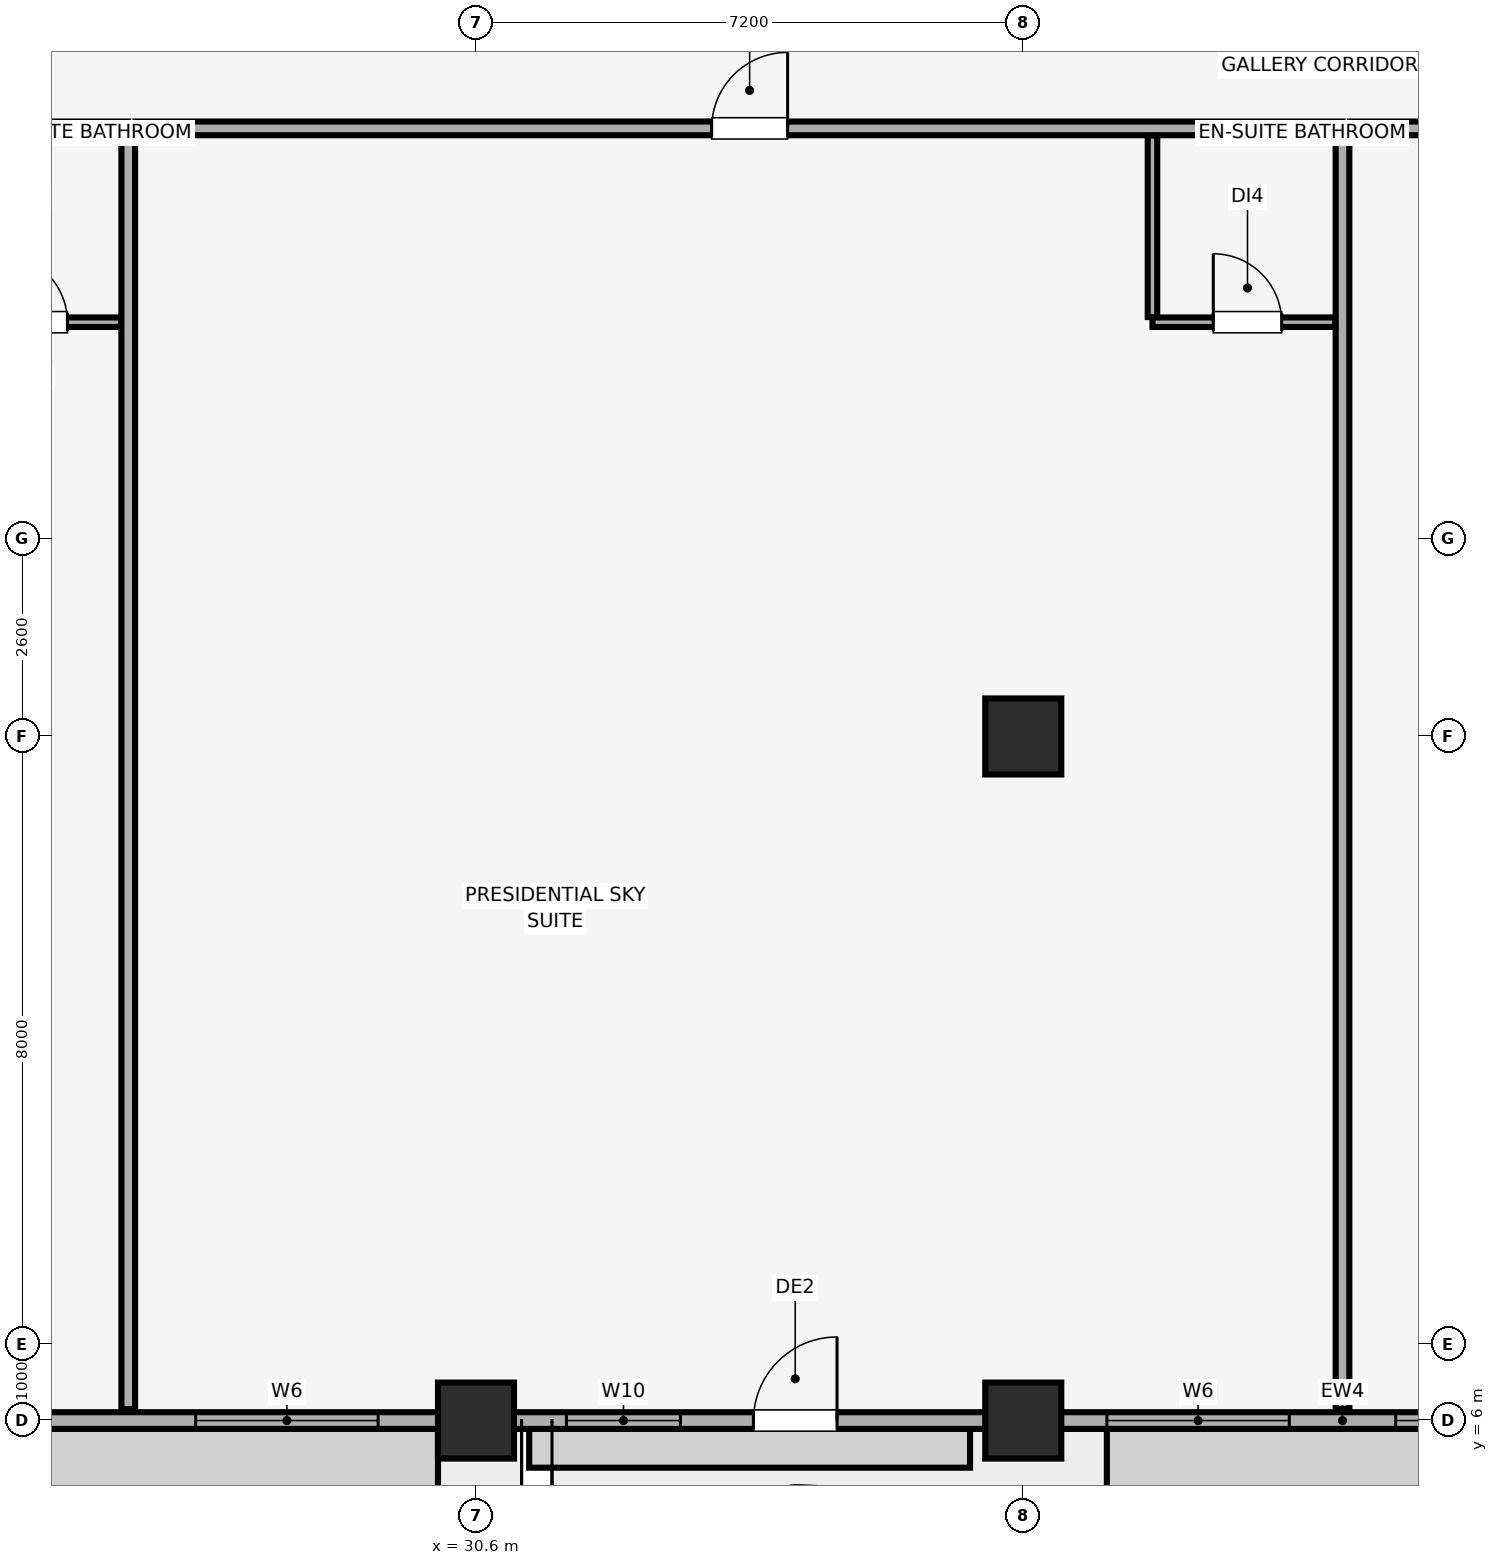
"""IFC4 building model, lengths in metres.
Left out: names, types, materials, properties, quantities, classifications, styles, units other than length and angle.
Written with IfcOpenShell. Run it as: python <this file> out.ifc"""

import sys

from ifc_helpers import new_model, si_unit, direction, frame, frame_2d, origin, origin_2d, place, context, subcontext, project, spatial, rectangle, extrude, element, fill, save


model = new_model("IFC4")
c1 = context("Model", 3, precision=1e-05, world=origin(), true_north=direction((0.0, 1.0)))
c2 = subcontext(c1, "Body", "Model", "MODEL_VIEW")
j1 = project(units=[si_unit("LENGTHUNIT", "METRE"), si_unit("PLANEANGLEUNIT", "RADIAN")], contexts=[c1])
p1 = place(None, origin())
s1 = spatial("IfcSite", under=j1, at=p1, CompositionType="ELEMENT")
p2 = place(p1, origin())
s2 = spatial("IfcBuilding", under=s1, at=p2, CompositionType="ELEMENT")
p3 = place(p2, frame((0.0, 0.0, 276.55)))
s3 = spatial("IfcBuildingStorey", under=s2, at=p3, CompositionType="ELEMENT", Elevation=276.55)
for number, where, z_axis, x_axis in (
    (1, (30.6, 6.0, 0.0), (0.0, 0.0, 1.0), (1.0, 0.0, 0.0)),
    (2, (37.8, 6.0, 0.0), (0.0, 0.0, 1.0), (1.0, 0.0, 0.0)),
    (3, (37.8, 15.0, 0.0), (0.0, 0.0, 1.0), (1.0, 0.0, 0.0)),
):
    element("IfcColumn", number, at=place(p3, frame(where, z_axis=z_axis, x_axis=x_axis)), inside=s3, PredefinedType="COLUMN", context=c2, shape_type="SweptSolid", body=[
        extrude(rectangle(XDim=1.0, YDim=1.0, at=origin_2d()), origin(), (0.0, 0.0, 1.0), 3.6),
    ])
p4 = place(p3, frame((9.8, 6.0, 0.0), z_axis=(0.0, 0.0, 1.0), x_axis=(1.0, 0.0, 0.0)))
e4 = element("IfcWall", 4, at=p4, inside=s3, PredefinedType="SOLIDWALL", context=c2, shape_type="SweptSolid", body=[
    extrude(rectangle(XDim=64.4, YDim=0.22, at=frame_2d((32.2, 0.0))), origin(), (0.0, 0.0, 1.0), 2.8),
])
p5 = place(p4, frame((10.45, 0.0, 0.0)))
e5 = element("IfcOpeningElement", 5, at=p5, cuts=e4, PredefinedType="OPENING", context=c2, shape_type="SweptSolid", body=[
    extrude(rectangle(XDim=1.1, YDim=2.15, at=frame_2d((0.55, 1.075))), frame((0.0, 0.12, 0.0), z_axis=(0.0, -1.0, 0.0), x_axis=(1.0, 0.0, 0.0)), (0.0, 0.0, 1.0), 0.24),
])
p6 = place(p4, frame((24.45, 0.0, 0.0)))
e6 = element("IfcOpeningElement", 6, at=p6, cuts=e4, PredefinedType="OPENING", context=c2, shape_type="SweptSolid", body=[
    extrude(rectangle(XDim=1.1, YDim=2.15, at=frame_2d((0.55, 1.075))), frame((0.0, 0.12, 0.0), z_axis=(0.0, -1.0, 0.0), x_axis=(1.0, 0.0, 0.0)), (0.0, 0.0, 1.0), 0.24),
])
p7 = place(p4, frame((52.85, 0.0, 0.0)))
e7 = element("IfcOpeningElement", 7, at=p7, cuts=e4, PredefinedType="OPENING", context=c2, shape_type="SweptSolid", body=[
    extrude(rectangle(XDim=1.1, YDim=2.15, at=frame_2d((0.55, 1.075))), frame((0.0, 0.12, 0.0), z_axis=(0.0, -1.0, 0.0), x_axis=(1.0, 0.0, 0.0)), (0.0, 0.0, 1.0), 0.24),
])
p8 = place(p4, frame((1.235, 0.0, 0.85)))
e8 = element("IfcOpeningElement", 8, at=p8, cuts=e4, PredefinedType="OPENING", context=c2, shape_type="SweptSolid", body=[
    extrude(rectangle(XDim=3.6, YDim=1.75, at=frame_2d((1.8, 0.875))), frame((0.0, 0.12, 0.0), z_axis=(0.0, -1.0, 0.0), x_axis=(1.0, 0.0, 0.0)), (0.0, 0.0, 1.0), 0.24),
])
p9 = place(p4, frame((7.34, 0.0, 0.85)))
e9 = element("IfcOpeningElement", 9, at=p9, cuts=e4, PredefinedType="OPENING", context=c2, shape_type="SweptSolid", body=[
    extrude(rectangle(XDim=2.4, YDim=1.5, at=frame_2d((1.2, 0.75))), frame((0.0, 0.12, 0.0), z_axis=(0.0, -1.0, 0.0), x_axis=(1.0, 0.0, 0.0)), (0.0, 0.0, 1.0), 0.24),
])
p10 = place(p4, frame((17.113, 0.0, 0.85)))
e10 = element("IfcOpeningElement", 10, at=p10, cuts=e4, PredefinedType="OPENING", context=c2, shape_type="SweptSolid", body=[
    extrude(rectangle(XDim=2.4, YDim=1.5, at=frame_2d((1.2, 0.75))), frame((0.0, 0.12, 0.0), z_axis=(0.0, -1.0, 0.0), x_axis=(1.0, 0.0, 0.0)), (0.0, 0.0, 1.0), 0.24),
])
p11 = place(p4, frame((21.99, 0.0, 0.85)))
e11 = element("IfcOpeningElement", 11, at=p11, cuts=e4, PredefinedType="OPENING", context=c2, shape_type="SweptSolid", body=[
    extrude(rectangle(XDim=1.5, YDim=1.4, at=frame_2d((0.75, 0.7))), frame((0.0, 0.12, 0.0), z_axis=(0.0, -1.0, 0.0), x_axis=(1.0, 0.0, 0.0)), (0.0, 0.0, 1.0), 0.24),
])
p12 = place(p4, frame((29.1, 0.0, 0.85)))
e12 = element("IfcOpeningElement", 12, at=p12, cuts=e4, PredefinedType="OPENING", context=c2, shape_type="SweptSolid", body=[
    extrude(rectangle(XDim=2.4, YDim=1.5, at=frame_2d((1.2, 0.75))), frame((0.0, 0.12, 0.0), z_axis=(0.0, -1.0, 0.0), x_axis=(1.0, 0.0, 0.0)), (0.0, 0.0, 1.0), 0.24),
])
p13 = place(p4, frame((32.9, 0.0, 0.85)))
e13 = element("IfcOpeningElement", 13, at=p13, cuts=e4, PredefinedType="OPENING", context=c2, shape_type="SweptSolid", body=[
    extrude(rectangle(XDim=2.4, YDim=1.5, at=frame_2d((1.2, 0.75))), frame((0.0, 0.12, 0.0), z_axis=(0.0, -1.0, 0.0), x_axis=(1.0, 0.0, 0.0)), (0.0, 0.0, 1.0), 0.24),
])
p14 = place(p4, frame((38.2, 0.0, 0.85)))
e14 = element("IfcOpeningElement", 14, at=p14, cuts=e4, PredefinedType="OPENING", context=c2, shape_type="SweptSolid", body=[
    extrude(rectangle(XDim=3.6, YDim=1.75, at=frame_2d((1.8, 0.875))), frame((0.0, 0.12, 0.0), z_axis=(0.0, -1.0, 0.0), x_axis=(1.0, 0.0, 0.0)), (0.0, 0.0, 1.0), 0.24),
])
p15 = place(p4, frame((44.887, 0.0, 0.85)))
e15 = element("IfcOpeningElement", 15, at=p15, cuts=e4, PredefinedType="OPENING", context=c2, shape_type="SweptSolid", body=[
    extrude(rectangle(XDim=2.4, YDim=1.5, at=frame_2d((1.2, 0.75))), frame((0.0, 0.12, 0.0), z_axis=(0.0, -1.0, 0.0), x_axis=(1.0, 0.0, 0.0)), (0.0, 0.0, 1.0), 0.24),
])
p16 = place(p4, frame((54.66, 0.0, 0.85)))
e16 = element("IfcOpeningElement", 16, at=p16, cuts=e4, PredefinedType="OPENING", context=c2, shape_type="SweptSolid", body=[
    extrude(rectangle(XDim=2.4, YDim=1.5, at=frame_2d((1.2, 0.75))), frame((0.0, 0.12, 0.0), z_axis=(0.0, -1.0, 0.0), x_axis=(1.0, 0.0, 0.0)), (0.0, 0.0, 1.0), 0.24),
])
p17 = place(p4, frame((59.565, 0.0, 0.85)))
e17 = element("IfcOpeningElement", 17, at=p17, cuts=e4, PredefinedType="OPENING", context=c2, shape_type="SweptSolid", body=[
    extrude(rectangle(XDim=3.6, YDim=1.75, at=frame_2d((1.8, 0.875))), frame((0.0, 0.12, 0.0), z_axis=(0.0, -1.0, 0.0), x_axis=(1.0, 0.0, 0.0)), (0.0, 0.0, 1.0), 0.24),
])
p18 = place(p3, frame((6.15, 23.0, 0.0), z_axis=(0.0, 0.0, 1.0), x_axis=(1.0, 0.0, 0.0)))
e18 = element("IfcWall", 18, at=p18, inside=s3, PredefinedType="PARTITIONING", context=c2, shape_type="SweptSolid", body=[
    extrude(rectangle(XDim=19.875, YDim=0.18, at=frame_2d((9.938, 0.0))), origin(), (0.0, 0.0, 1.0), 3.6),
])
p19 = place(p18, frame((13.15, 0.0, 0.0)))
e19 = element("IfcOpeningElement", 19, at=p19, cuts=e18, PredefinedType="OPENING", context=c2, shape_type="SweptSolid", body=[
    extrude(rectangle(XDim=1.0, YDim=2.15, at=frame_2d((0.5, 1.075))), frame((0.0, 0.1, 0.0), z_axis=(0.0, -1.0, 0.0), x_axis=(1.0, 0.0, 0.0)), (0.0, 0.0, 1.0), 0.2),
])
p20 = place(p3, frame((26.025, 6.15, 0.0), z_axis=(0.0, 0.0, 1.0), x_axis=(0.0, 1.0, 0.0)))
e20 = element("IfcWall", 20, at=p20, inside=s3, PredefinedType="PARTITIONING", context=c2, shape_type="SweptSolid", body=[
    extrude(rectangle(XDim=16.755, YDim=0.18, at=frame_2d((8.377, 0.0))), origin(), (0.0, 0.0, 1.0), 3.6),
])
p21 = place(p3, frame((23.525, 20.45, 0.0), z_axis=(0.0, 0.0, 1.0), x_axis=(1.0, 0.0, 0.0)))
e21 = element("IfcWall", 21, at=p21, inside=s3, PredefinedType="PARTITIONING", context=c2, shape_type="SweptSolid", body=[
    extrude(rectangle(XDim=2.405, YDim=0.125, at=frame_2d((1.203, 0.0))), origin(), (0.0, 0.0, 1.0), 3.6),
])
p22 = place(p21, frame((0.8, 0.0, 0.0)))
e22 = element("IfcOpeningElement", 22, at=p22, cuts=e21, PredefinedType="OPENING", context=c2, shape_type="SweptSolid", body=[
    extrude(rectangle(XDim=0.9, YDim=2.1, at=frame_2d((0.45, 1.05))), frame((0.0, 0.073, 0.0), z_axis=(0.0, -1.0, 0.0), x_axis=(1.0, 0.0, 0.0)), (0.0, 0.0, 1.0), 0.145),
])
p23 = place(p3, frame((26.12, 23.0, 0.0), z_axis=(0.0, 0.0, 1.0), x_axis=(1.0, 0.0, 0.0)))
e23 = element("IfcWall", 23, at=p23, inside=s3, PredefinedType="PARTITIONING", context=c2, shape_type="SweptSolid", body=[
    extrude(rectangle(XDim=15.88, YDim=0.18, at=frame_2d((7.94, 0.0))), origin(), (0.0, 0.0, 1.0), 3.6),
])
p24 = place(p23, frame((7.58, 0.0, 0.0)))
e24 = element("IfcOpeningElement", 24, at=p24, cuts=e23, PredefinedType="OPENING", context=c2, shape_type="SweptSolid", body=[
    extrude(rectangle(XDim=1.0, YDim=2.15, at=frame_2d((0.5, 1.075))), frame((0.0, 0.1, 0.0), z_axis=(0.0, -1.0, 0.0), x_axis=(1.0, 0.0, 0.0)), (0.0, 0.0, 1.0), 0.2),
])
p25 = place(p3, frame((42.0, 6.15, 0.0), z_axis=(0.0, 0.0, 1.0), x_axis=(0.0, 1.0, 0.0)))
e25 = element("IfcWall", 25, at=p25, inside=s3, PredefinedType="PARTITIONING", context=c2, shape_type="SweptSolid", body=[
    extrude(rectangle(XDim=16.755, YDim=0.18, at=frame_2d((8.377, 0.0))), origin(), (0.0, 0.0, 1.0), 3.0),
])
p26 = place(p3, frame((39.5, 20.45, 0.0), z_axis=(0.0, 0.0, 1.0), x_axis=(1.0, 0.0, 0.0)))
e26 = element("IfcWall", 26, at=p26, inside=s3, PredefinedType="PARTITIONING", context=c2, shape_type="SweptSolid", body=[
    extrude(rectangle(XDim=2.405, YDim=0.125, at=frame_2d((1.203, 0.0))), origin(), (0.0, 0.0, 1.0), 3.6),
])
p27 = place(p26, frame((0.8, 0.0, 0.0)))
e27 = element("IfcOpeningElement", 27, at=p27, cuts=e26, PredefinedType="OPENING", context=c2, shape_type="SweptSolid", body=[
    extrude(rectangle(XDim=0.9, YDim=2.1, at=frame_2d((0.45, 1.05))), frame((0.0, 0.073, 0.0), z_axis=(0.0, -1.0, 0.0), x_axis=(1.0, 0.0, 0.0)), (0.0, 0.0, 1.0), 0.145),
])
p28 = place(p3, frame((39.5, 20.518, 0.0), z_axis=(0.0, 0.0, 1.0), x_axis=(0.0, 1.0, 0.0)))
e28 = element("IfcWall", 28, at=p28, inside=s3, PredefinedType="PARTITIONING", context=c2, shape_type="SweptSolid", body=[
    extrude(rectangle(XDim=2.387, YDim=0.125, at=frame_2d((1.194, 0.0))), origin(), (0.0, 0.0, 1.0), 3.6),
])
p29 = place(p3, frame((42.095, 23.0, 0.0), z_axis=(0.0, 0.0, 1.0), x_axis=(1.0, 0.0, 0.0)))
e29 = element("IfcWall", 29, at=p29, inside=s3, PredefinedType="PARTITIONING", context=c2, shape_type="SweptSolid", body=[
    extrude(rectangle(XDim=15.88, YDim=0.18, at=frame_2d((7.94, 0.0))), origin(), (0.0, 0.0, 1.0), 3.6),
])
p30 = place(p29, frame((7.205, 0.0, 0.0)))
e30 = element("IfcOpeningElement", 30, at=p30, cuts=e29, PredefinedType="OPENING", context=c2, shape_type="SweptSolid", body=[
    extrude(rectangle(XDim=1.0, YDim=2.15, at=frame_2d((0.5, 1.075))), frame((0.0, 0.1, 0.0), z_axis=(0.0, -1.0, 0.0), x_axis=(1.0, 0.0, 0.0)), (0.0, 0.0, 1.0), 0.2),
])
p31 = place(p6, origin())
e31 = element("IfcDoor", 31, at=p31, inside=s3, OperationType="SINGLE_SWING_RIGHT", PredefinedType="DOOR", context=c2, shape_type="SweptSolid", body=[
    extrude(rectangle(XDim=1.1, YDim=2.15, at=frame_2d((0.55, 1.075))), frame((0.0, 0.025, 0.0), z_axis=(0.0, -1.0, 0.0), x_axis=(1.0, 0.0, 0.0)), (0.0, 0.0, 1.0), 0.05),
])
fill(e6, e31)
p32 = place(p10, origin())
e32 = element("IfcWindow", 32, at=p32, inside=s3, PartitioningType="SINGLE_PANEL", PredefinedType="WINDOW", context=c2, shape_type="SweptSolid", body=[
    extrude(rectangle(XDim=2.4, YDim=1.5, at=frame_2d((1.2, 0.75))), frame((0.0, 0.03, 0.0), z_axis=(0.0, -1.0, 0.0), x_axis=(1.0, 0.0, 0.0)), (0.0, 0.0, 1.0), 0.06),
])
fill(e10, e32)
p33 = place(p11, origin())
e33 = element("IfcWindow", 33, at=p33, inside=s3, PartitioningType="SINGLE_PANEL", PredefinedType="WINDOW", context=c2, shape_type="SweptSolid", body=[
    extrude(rectangle(XDim=1.5, YDim=1.4, at=frame_2d((0.75, 0.7))), frame((0.0, 0.03, 0.0), z_axis=(0.0, -1.0, 0.0), x_axis=(1.0, 0.0, 0.0)), (0.0, 0.0, 1.0), 0.06),
])
fill(e11, e33)
p34 = place(p12, origin())
e34 = element("IfcWindow", 34, at=p34, inside=s3, PartitioningType="SINGLE_PANEL", PredefinedType="WINDOW", context=c2, shape_type="SweptSolid", body=[
    extrude(rectangle(XDim=2.4, YDim=1.5, at=frame_2d((1.2, 0.75))), frame((0.0, 0.03, 0.0), z_axis=(0.0, -1.0, 0.0), x_axis=(1.0, 0.0, 0.0)), (0.0, 0.0, 1.0), 0.06),
])
fill(e12, e34)
p35 = place(p13, origin())
e35 = element("IfcWindow", 35, at=p35, inside=s3, PartitioningType="SINGLE_PANEL", PredefinedType="WINDOW", context=c2, shape_type="SweptSolid", body=[
    extrude(rectangle(XDim=2.4, YDim=1.5, at=frame_2d((1.2, 0.75))), frame((0.0, 0.03, 0.0), z_axis=(0.0, -1.0, 0.0), x_axis=(1.0, 0.0, 0.0)), (0.0, 0.0, 1.0), 0.06),
])
fill(e13, e35)
p36 = place(p22, origin())
e36 = element("IfcDoor", 36, at=p36, inside=s3, OperationType="SINGLE_SWING_LEFT", PredefinedType="DOOR", context=c2, shape_type="SweptSolid", body=[
    extrude(rectangle(XDim=0.9, YDim=2.1, at=frame_2d((0.45, 1.05))), frame((0.0, 0.025, 0.0), z_axis=(0.0, -1.0, 0.0), x_axis=(1.0, 0.0, 0.0)), (0.0, 0.0, 1.0), 0.05),
])
fill(e22, e36)
p37 = place(p24, origin())
e37 = element("IfcDoor", 37, at=p37, inside=s3, OperationType="SINGLE_SWING_RIGHT", PredefinedType="DOOR", context=c2, shape_type="SweptSolid", body=[
    extrude(rectangle(XDim=1.0, YDim=2.15, at=frame_2d((0.5, 1.075))), frame((0.0, 0.025, 0.0), z_axis=(0.0, -1.0, 0.0), x_axis=(1.0, 0.0, 0.0)), (0.0, 0.0, 1.0), 0.05),
])
fill(e24, e37)
p38 = place(p27, origin())
e38 = element("IfcDoor", 38, at=p38, inside=s3, OperationType="SINGLE_SWING_LEFT", PredefinedType="DOOR", context=c2, shape_type="SweptSolid", body=[
    extrude(rectangle(XDim=0.9, YDim=2.1, at=frame_2d((0.45, 1.05))), frame((0.0, 0.025, 0.0), z_axis=(0.0, -1.0, 0.0), x_axis=(1.0, 0.0, 0.0)), (0.0, 0.0, 1.0), 0.05),
])
fill(e27, e38)
save(model, sys.argv[1])
